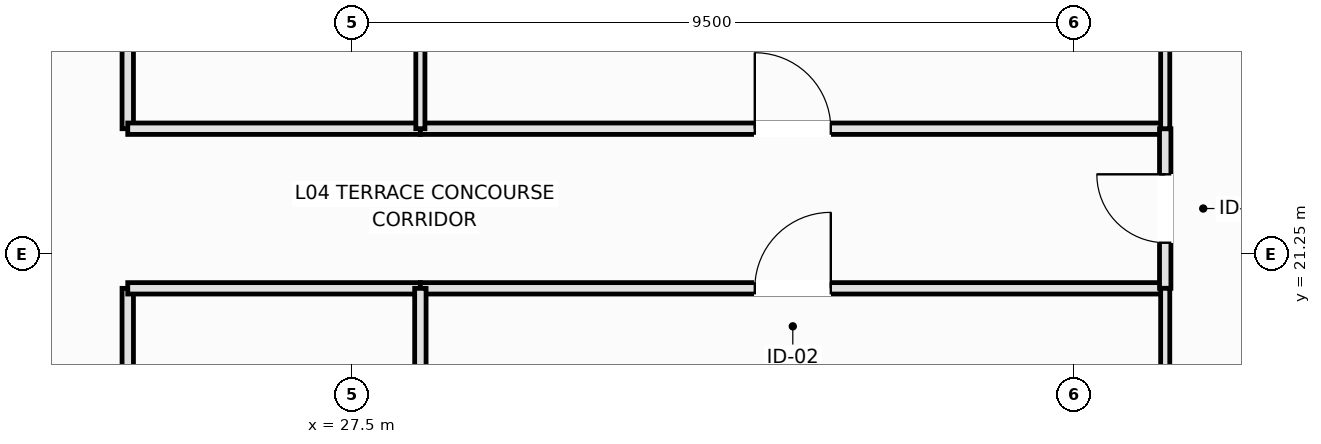
"""IFC4 building model, lengths in metres.
Left out: names, types, materials, properties, quantities, classifications, styles, units other than length and angle.
Written with IfcOpenShell. Run it as: python <this file> out.ifc"""

import sys

from ifc_helpers import new_model, si_unit, direction, frame, frame_2d, origin, place, context, subcontext, project, spatial, rectangle, extrude, element, fill, save


model = new_model("IFC4")
c1 = context("Model", 3, precision=1e-05, world=origin(), true_north=direction((0.0, 1.0)))
c2 = subcontext(c1, "Body", "Model", "MODEL_VIEW")
j1 = project(units=[si_unit("LENGTHUNIT", "METRE"), si_unit("PLANEANGLEUNIT", "RADIAN")], contexts=[c1])
p1 = place(None, origin())
s1 = spatial("IfcSite", under=j1, at=p1, CompositionType="ELEMENT")
p2 = place(p1, origin())
s2 = spatial("IfcBuilding", under=s1, at=p2, CompositionType="ELEMENT")
p3 = place(p2, frame((0.0, 0.0, 20.4)))
s3 = spatial("IfcBuildingStorey", under=s2, at=p3, CompositionType="ELEMENT", Elevation=20.4)
p4 = place(p3, frame((24.55, 17.2, 0.0), z_axis=(0.0, 0.0, 1.0), x_axis=(0.0, 1.0, 0.0)))
e1 = element("IfcWall", 1, at=p4, inside=s3, PredefinedType="PLUMBINGWALL", context=c2, shape_type="SweptSolid", body=[
    extrude(rectangle(XDim=3.6, YDim=0.15, at=frame_2d((1.8, 0.0))), origin(), (0.0, 0.0, 1.0), 5.02),
])
p5 = place(p4, frame((1.35, 0.0, 0.0)))
e2 = element("IfcOpeningElement", 2, at=p5, cuts=e1, PredefinedType="OPENING", context=c2, shape_type="SweptSolid", body=[
    extrude(rectangle(XDim=0.9, YDim=2.1, at=frame_2d((0.45, 1.05))), frame((0.0, 0.085, 0.0), z_axis=(0.0, -1.0, 0.0), x_axis=(1.0, 0.0, 0.0)), (0.0, 0.0, 1.0), 0.17),
])
p6 = place(p3, frame((24.55, 22.9, 0.0), z_axis=(0.0, 0.0, 1.0), x_axis=(0.0, 1.0, 0.0)))
e3 = element("IfcWall", 3, at=p6, inside=s3, PredefinedType="PARTITIONING", context=c2, shape_type="SweptSolid", body=[
    extrude(rectangle(XDim=7.6, YDim=0.15, at=frame_2d((3.8, 0.0))), origin(), (0.0, 0.0, 1.0), 5.02),
])
p7 = place(p6, frame((3.3, 0.0, 0.0)))
e4 = element("IfcOpeningElement", 4, at=p7, cuts=e3, PredefinedType="OPENING", context=c2, shape_type="SweptSolid", body=[
    extrude(rectangle(XDim=1.0, YDim=2.15, at=frame_2d((0.5, 1.075))), frame((0.0, 0.085, 0.0), z_axis=(0.0, -1.0, 0.0), x_axis=(1.0, 0.0, 0.0)), (0.0, 0.0, 1.0), 0.17),
])
p8 = place(p3, frame((24.55, 20.8, 0.0), z_axis=(0.0, 0.0, 1.0), x_axis=(1.0, 0.0, 0.0)))
e5 = element("IfcWall", 5, at=p8, inside=s3, PredefinedType="PLUMBINGWALL", context=c2, shape_type="SweptSolid", body=[
    extrude(rectangle(XDim=3.85, YDim=0.15, at=frame_2d((1.925, 0.0))), origin(), (0.0, 0.0, 1.0), 5.02),
])
p9 = place(p3, frame((28.4, 20.8, 0.0), z_axis=(0.0, 0.0, 1.0), x_axis=(1.0, 0.0, 0.0)))
e6 = element("IfcWall", 6, at=p9, inside=s3, PredefinedType="PARTITIONING", context=c2, shape_type="SweptSolid", body=[
    extrude(rectangle(XDim=9.8, YDim=0.15, at=frame_2d((4.9, 0.0))), origin(), (0.0, 0.0, 1.0), 5.02),
])
p10 = place(p9, frame((4.4, 0.0, 0.0)))
e7 = element("IfcOpeningElement", 7, at=p10, cuts=e6, PredefinedType="OPENING", context=c2, shape_type="SweptSolid", body=[
    extrude(rectangle(XDim=1.0, YDim=2.15, at=frame_2d((0.5, 1.075))), frame((0.0, 0.085, 0.0), z_axis=(0.0, -1.0, 0.0), x_axis=(1.0, 0.0, 0.0)), (0.0, 0.0, 1.0), 0.17),
])
p11 = place(p3, frame((24.55, 22.9, 0.0), z_axis=(0.0, 0.0, 1.0), x_axis=(1.0, 0.0, 0.0)))
e8 = element("IfcWall", 8, at=p11, inside=s3, PredefinedType="PARTITIONING", context=c2, shape_type="SweptSolid", body=[
    extrude(rectangle(XDim=3.85, YDim=0.15, at=frame_2d((1.925, 0.0))), origin(), (0.0, 0.0, 1.0), 5.02),
])
p12 = place(p3, frame((28.4, 22.9, 0.0), z_axis=(0.0, 0.0, 1.0), x_axis=(1.0, 0.0, 0.0)))
e9 = element("IfcWall", 9, at=p12, inside=s3, PredefinedType="PARTITIONING", context=c2, shape_type="SweptSolid", body=[
    extrude(rectangle(XDim=9.8, YDim=0.15, at=frame_2d((4.9, 0.0))), origin(), (0.0, 0.0, 1.0), 5.02),
])
p13 = place(p12, frame((4.4, 0.0, 0.0)))
e10 = element("IfcOpeningElement", 10, at=p13, cuts=e9, PredefinedType="OPENING", context=c2, shape_type="SweptSolid", body=[
    extrude(rectangle(XDim=1.0, YDim=2.15, at=frame_2d((0.5, 1.075))), frame((0.0, 0.085, 0.0), z_axis=(0.0, -1.0, 0.0), x_axis=(1.0, 0.0, 0.0)), (0.0, 0.0, 1.0), 0.17),
])
p14 = place(p3, frame((38.2, 20.8, 0.0), z_axis=(0.0, 0.0, 1.0), x_axis=(0.0, 1.0, 0.0)))
e11 = element("IfcWall", 11, at=p14, inside=s3, PredefinedType="PARTITIONING", context=c2, shape_type="SweptSolid", body=[
    extrude(rectangle(XDim=2.1, YDim=0.15, at=frame_2d((1.05, 0.0))), origin(), (0.0, 0.0, 1.0), 4.42),
])
p15 = place(p14, frame((0.6, 0.0, 0.0)))
e12 = element("IfcOpeningElement", 12, at=p15, cuts=e11, PredefinedType="OPENING", context=c2, shape_type="SweptSolid", body=[
    extrude(rectangle(XDim=0.9, YDim=2.1, at=frame_2d((0.45, 1.05))), frame((0.0, 0.085, 0.0), z_axis=(0.0, -1.0, 0.0), x_axis=(1.0, 0.0, 0.0)), (0.0, 0.0, 1.0), 0.17),
])
p16 = place(p3, frame((28.4, 17.2, 0.0), z_axis=(0.0, 0.0, 1.0), x_axis=(0.0, 1.0, 0.0)))
e13 = element("IfcWall", 13, at=p16, inside=s3, PredefinedType="PLUMBINGWALL", context=c2, shape_type="SweptSolid", body=[
    extrude(rectangle(XDim=3.6, YDim=0.15, at=frame_2d((1.8, 0.0))), origin(), (0.0, 0.0, 1.0), 5.02),
])
p17 = place(p3, frame((38.2, 14.0, 0.0), z_axis=(0.0, 0.0, 1.0), x_axis=(0.0, 1.0, 0.0)))
e14 = element("IfcWall", 14, at=p17, inside=s3, PredefinedType="PARTITIONING", context=c2, shape_type="SweptSolid", body=[
    extrude(rectangle(XDim=6.8, YDim=0.12, at=frame_2d((3.4, 0.0))), origin(), (0.0, 0.0, 1.0), 4.42),
])
p18 = place(p3, frame((28.4, 22.9, 0.0), z_axis=(0.0, 0.0, 1.0), x_axis=(0.0, 1.0, 0.0)))
e15 = element("IfcWall", 15, at=p18, inside=s3, PredefinedType="PARTITIONING", context=c2, shape_type="SweptSolid", body=[
    extrude(rectangle(XDim=7.6, YDim=0.12, at=frame_2d((3.8, 0.0))), origin(), (0.0, 0.0, 1.0), 5.02),
])
p19 = place(p3, frame((38.2, 22.9, 0.0), z_axis=(0.0, 0.0, 1.0), x_axis=(0.0, 1.0, 0.0)))
e16 = element("IfcWall", 16, at=p19, inside=s3, PredefinedType="PARTITIONING", context=c2, shape_type="SweptSolid", body=[
    extrude(rectangle(XDim=13.6, YDim=0.12, at=frame_2d((6.8, 0.0))), origin(), (0.0, 0.0, 1.0), 4.42),
])
p20 = place(p10, origin())
e17 = element("IfcDoor", 17, at=p20, inside=s3, OperationType="SINGLE_SWING_RIGHT", PredefinedType="DOOR", context=c2, shape_type="SweptSolid", body=[
    extrude(rectangle(XDim=1.0, YDim=2.15, at=frame_2d((0.5, 1.075))), frame((0.0, 0.025, 0.0), z_axis=(0.0, -1.0, 0.0), x_axis=(1.0, 0.0, 0.0)), (0.0, 0.0, 1.0), 0.05),
])
fill(e7, e17)
p21 = place(p13, origin())
e18 = element("IfcDoor", 18, at=p21, inside=s3, OperationType="SINGLE_SWING_LEFT", PredefinedType="DOOR", context=c2, shape_type="SweptSolid", body=[
    extrude(rectangle(XDim=1.0, YDim=2.15, at=frame_2d((0.5, 1.075))), frame((0.0, 0.025, 0.0), z_axis=(0.0, -1.0, 0.0), x_axis=(1.0, 0.0, 0.0)), (0.0, 0.0, 1.0), 0.05),
])
fill(e10, e18)
p22 = place(p15, origin())
e19 = element("IfcDoor", 19, at=p22, inside=s3, OperationType="SINGLE_SWING_RIGHT", PredefinedType="DOOR", context=c2, shape_type="SweptSolid", body=[
    extrude(rectangle(XDim=0.9, YDim=2.1, at=frame_2d((0.45, 1.05))), frame((0.0, 0.025, 0.0), z_axis=(0.0, -1.0, 0.0), x_axis=(1.0, 0.0, 0.0)), (0.0, 0.0, 1.0), 0.05),
])
fill(e12, e19)
save(model, sys.argv[1])
